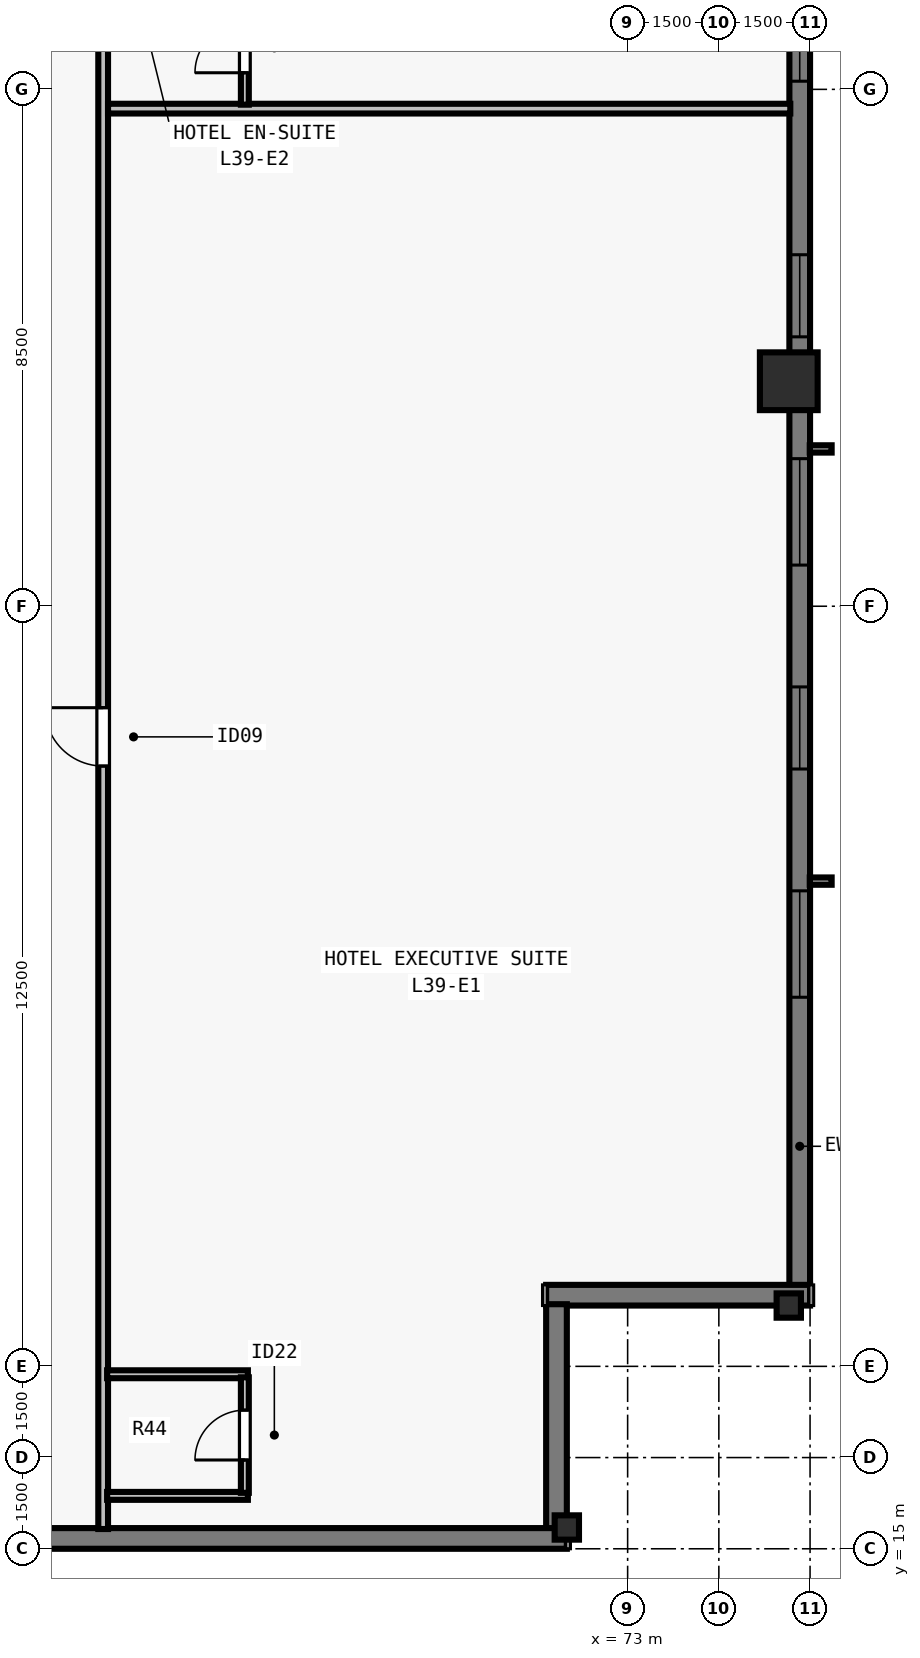
"""IFC4 building model, lengths in metres.
Left out: names, types, materials, properties, quantities, classifications, styles, units other than length and angle.
Written with IfcOpenShell. Run it as: python <this file> out.ifc"""

import sys

from ifc_helpers import new_model, si_unit, direction, frame, frame_2d, origin, origin_2d, place, context, subcontext, project, spatial, rectangle, i_section, extrude, element, fill, save


model = new_model("IFC4")
c1 = context("Model", 3, precision=1e-05, world=origin(), true_north=direction((0.0, 1.0)))
c2 = subcontext(c1, "Body", "Model", "MODEL_VIEW")
j1 = project(units=[si_unit("LENGTHUNIT", "METRE"), si_unit("PLANEANGLEUNIT", "RADIAN")], contexts=[c1])
p1 = place(None, origin())
s1 = spatial("IfcSite", under=j1, at=p1, CompositionType="ELEMENT")
p2 = place(p1, origin())
s2 = spatial("IfcBuilding", under=s1, at=p2, CompositionType="ELEMENT")
p3 = place(p2, frame((0.0, 0.0, 144.5)))
s3 = spatial("IfcBuildingStorey", under=s2, at=p3, CompositionType="ELEMENT", Elevation=144.5)
for number, where, z_axis, x_axis in (
    (1, (72.0, 15.35, 0.0), (0.0, 0.0, 1.0), (1.0, 0.0, 0.0)),
    (2, (75.65, 19.0, 0.0), (0.0, 0.0, 1.0), (0.0, 1.0, 0.0)),
):
    element("IfcColumn", number, at=place(p3, frame(where, z_axis=z_axis, x_axis=x_axis)), inside=s3, PredefinedType="COLUMN", context=c2, shape_type="SweptSolid", body=[
        extrude(i_section(OverallWidth=0.4, OverallDepth=0.4, WebThickness=0.022, FlangeThickness=0.036, at=origin_2d()), origin(), (0.0, 0.0, 1.0), 3.5),
    ])
p4 = place(p3, frame((75.65, 34.2, 0.0), z_axis=(0.0, 0.0, 1.0), x_axis=(0.0, 1.0, 0.0)))
e3 = element("IfcColumn", 3, at=p4, inside=s3, PredefinedType="COLUMN", context=c2, shape_type="SweptSolid", body=[
    extrude(rectangle(XDim=0.95, YDim=0.95, at=origin_2d()), origin(), (0.0, 0.0, 1.0), 3.5),
])
p5 = place(p3, frame((75.83, 59.0, 0.0), z_axis=(0.0, 0.0, 1.0), x_axis=(0.0, -1.0, 0.0)))
e4 = element("IfcWall", 4, at=p5, inside=s3, PredefinedType="SOLIDWALL", context=c2, shape_type="SweptSolid", body=[
    extrude(rectangle(XDim=39.682, YDim=0.34, at=frame_2d((19.841, 0.0))), origin(), (0.0, 0.0, 1.0), 3.28),
])
p6 = place(p5, frame((4.752, 0.0, 0.8)))
e5 = element("IfcOpeningElement", 5, at=p6, cuts=e4, PredefinedType="OPENING", context=c2, shape_type="SweptSolid", body=[
    extrude(rectangle(XDim=1.75, YDim=1.66, at=frame_2d((0.875, 0.83))), frame((0.0, 0.18, 0.0), z_axis=(0.0, -1.0, 0.0), x_axis=(1.0, 0.0, 0.0)), (0.0, 0.0, 1.0), 0.36),
])
p7 = place(p5, frame((8.505, 0.0, 0.8)))
e6 = element("IfcOpeningElement", 6, at=p7, cuts=e4, PredefinedType="OPENING", context=c2, shape_type="SweptSolid", body=[
    extrude(rectangle(XDim=1.35, YDim=1.66, at=frame_2d((0.675, 0.83))), frame((0.0, 0.18, 0.0), z_axis=(0.0, -1.0, 0.0), x_axis=(1.0, 0.0, 0.0)), (0.0, 0.0, 1.0), 0.36),
])
p8 = place(p5, frame((11.859, 0.0, 0.8)))
e7 = element("IfcOpeningElement", 7, at=p8, cuts=e4, PredefinedType="OPENING", context=c2, shape_type="SweptSolid", body=[
    extrude(rectangle(XDim=1.75, YDim=1.66, at=frame_2d((0.875, 0.83))), frame((0.0, 0.18, 0.0), z_axis=(0.0, -1.0, 0.0), x_axis=(1.0, 0.0, 0.0)), (0.0, 0.0, 1.0), 0.36),
])
p9 = place(p5, frame((16.062, 0.0, 0.8)))
e8 = element("IfcOpeningElement", 8, at=p9, cuts=e4, PredefinedType="OPENING", context=c2, shape_type="SweptSolid", body=[
    extrude(rectangle(XDim=1.35, YDim=1.66, at=frame_2d((0.675, 0.83))), frame((0.0, 0.18, 0.0), z_axis=(0.0, -1.0, 0.0), x_axis=(1.0, 0.0, 0.0)), (0.0, 0.0, 1.0), 0.36),
])
p10 = place(p5, frame((18.116, 0.0, 0.8)))
e9 = element("IfcOpeningElement", 9, at=p10, cuts=e4, PredefinedType="OPENING", context=c2, shape_type="SweptSolid", body=[
    extrude(rectangle(XDim=1.75, YDim=1.66, at=frame_2d((0.875, 0.83))), frame((0.0, 0.18, 0.0), z_axis=(0.0, -1.0, 0.0), x_axis=(1.0, 0.0, 0.0)), (0.0, 0.0, 1.0), 0.36),
])
p11 = place(p5, frame((22.719, 0.0, 0.8)))
e10 = element("IfcOpeningElement", 10, at=p11, cuts=e4, PredefinedType="OPENING", context=c2, shape_type="SweptSolid", body=[
    extrude(rectangle(XDim=1.35, YDim=1.66, at=frame_2d((0.675, 0.83))), frame((0.0, 0.18, 0.0), z_axis=(0.0, -1.0, 0.0), x_axis=(1.0, 0.0, 0.0)), (0.0, 0.0, 1.0), 0.36),
])
p12 = place(p5, frame((26.073, 0.0, 0.8)))
e11 = element("IfcOpeningElement", 11, at=p12, cuts=e4, PredefinedType="OPENING", context=c2, shape_type="SweptSolid", body=[
    extrude(rectangle(XDim=1.75, YDim=1.66, at=frame_2d((0.875, 0.83))), frame((0.0, 0.18, 0.0), z_axis=(0.0, -1.0, 0.0), x_axis=(1.0, 0.0, 0.0)), (0.0, 0.0, 1.0), 0.36),
])
p13 = place(p5, frame((29.827, 0.0, 0.8)))
e12 = element("IfcOpeningElement", 12, at=p13, cuts=e4, PredefinedType="OPENING", context=c2, shape_type="SweptSolid", body=[
    extrude(rectangle(XDim=1.35, YDim=1.66, at=frame_2d((0.675, 0.83))), frame((0.0, 0.18, 0.0), z_axis=(0.0, -1.0, 0.0), x_axis=(1.0, 0.0, 0.0)), (0.0, 0.0, 1.0), 0.36),
])
p14 = place(p5, frame((33.18, 0.0, 0.8)))
e13 = element("IfcOpeningElement", 13, at=p14, cuts=e4, PredefinedType="OPENING", context=c2, shape_type="SweptSolid", body=[
    extrude(rectangle(XDim=1.75, YDim=1.66, at=frame_2d((0.875, 0.83))), frame((0.0, 0.18, 0.0), z_axis=(0.0, -1.0, 0.0), x_axis=(1.0, 0.0, 0.0)), (0.0, 0.0, 1.0), 0.36),
])
p15 = place(p3, frame((76.0, 19.17, 0.0), z_axis=(0.0, 0.0, 1.0), x_axis=(-1.0, 0.0, 0.0)))
e14 = element("IfcWall", 14, at=p15, inside=s3, PredefinedType="SOLIDWALL", context=c2, shape_type="SweptSolid", body=[
    extrude(rectangle(XDim=4.34, YDim=0.34, at=frame_2d((2.17, 0.0))), origin(), (0.0, 0.0, 1.0), 3.28),
])
p16 = place(p3, frame((71.83, 19.022, 0.0), z_axis=(0.0, 0.0, 1.0), x_axis=(0.0, -1.0, 0.0)))
e15 = element("IfcWall", 15, at=p16, inside=s3, PredefinedType="SOLIDWALL", context=c2, shape_type="SweptSolid", body=[
    extrude(rectangle(XDim=3.704, YDim=0.34, at=frame_2d((1.852, 0.0))), origin(), (0.0, 0.0, 1.0), 3.28),
])
p17 = place(p3, frame((72.0, 15.17, 0.0), z_axis=(0.0, 0.0, 1.0), x_axis=(-1.0, 0.0, 0.0)))
e16 = element("IfcWall", 16, at=p17, inside=s3, PredefinedType="SOLIDWALL", context=c2, shape_type="SweptSolid", body=[
    extrude(rectangle(XDim=25.882, YDim=0.34, at=frame_2d((12.941, 0.0))), origin(), (0.0, 0.0, 1.0), 3.28),
])
p18 = place(p17, frame((12.066, 0.0, 0.8)))
e17 = element("IfcOpeningElement", 17, at=p18, cuts=e16, PredefinedType="OPENING", context=c2, shape_type="SweptSolid", body=[
    extrude(rectangle(XDim=1.75, YDim=1.66, at=frame_2d((0.875, 0.83))), frame((0.0, 0.18, 0.0), z_axis=(0.0, -1.0, 0.0), x_axis=(1.0, 0.0, 0.0)), (0.0, 0.0, 1.0), 0.36),
])
p19 = place(p17, frame((15.902, 0.0, 0.8)))
e18 = element("IfcOpeningElement", 18, at=p19, cuts=e16, PredefinedType="OPENING", context=c2, shape_type="SweptSolid", body=[
    extrude(rectangle(XDim=1.35, YDim=1.66, at=frame_2d((0.675, 0.83))), frame((0.0, 0.18, 0.0), z_axis=(0.0, -1.0, 0.0), x_axis=(1.0, 0.0, 0.0)), (0.0, 0.0, 1.0), 0.36),
])
p20 = place(p17, frame((18.889, 0.0, 0.8)))
e19 = element("IfcOpeningElement", 19, at=p20, cuts=e16, PredefinedType="OPENING", context=c2, shape_type="SweptSolid", body=[
    extrude(rectangle(XDim=1.75, YDim=1.66, at=frame_2d((0.875, 0.83))), frame((0.0, 0.18, 0.0), z_axis=(0.0, -1.0, 0.0), x_axis=(1.0, 0.0, 0.0)), (0.0, 0.0, 1.0), 0.36),
])
p21 = place(p17, frame((21.59, 0.0, 0.8)))
e20 = element("IfcOpeningElement", 20, at=p21, cuts=e16, PredefinedType="OPENING", context=c2, shape_type="SweptSolid", body=[
    extrude(rectangle(XDim=0.9, YDim=1.66, at=frame_2d((0.45, 0.83))), frame((0.0, 0.18, 0.0), z_axis=(0.0, -1.0, 0.0), x_axis=(1.0, 0.0, 0.0)), (0.0, 0.0, 1.0), 0.36),
])
p22 = place(p3, frame((64.375, 15.325, 0.0), z_axis=(0.0, 0.0, 1.0), x_axis=(0.0, 1.0, 0.0)))
e21 = element("IfcWall", 21, at=p22, inside=s3, PredefinedType="PARTITIONING", context=c2, shape_type="SweptSolid", body=[
    extrude(rectangle(XDim=47.35, YDim=0.16, at=frame_2d((23.675, 0.0))), origin(), (0.0, 0.0, 1.0), 2.555),
])
p23 = place(p22, frame((12.547, 0.0, 0.0)))
e22 = element("IfcOpeningElement", 22, at=p23, cuts=e21, PredefinedType="OPENING", context=c2, shape_type="SweptSolid", body=[
    extrude(rectangle(XDim=0.96, YDim=2.15, at=frame_2d((0.48, 1.075))), frame((0.0, 0.09, 0.0), z_axis=(0.0, -1.0, 0.0), x_axis=(1.0, 0.0, 0.0)), (0.0, 0.0, 1.0), 0.18),
])
p24 = place(p22, frame((35.902, 0.0, 0.0)))
e23 = element("IfcOpeningElement", 23, at=p24, cuts=e21, PredefinedType="OPENING", context=c2, shape_type="SweptSolid", body=[
    extrude(rectangle(XDim=0.96, YDim=2.15, at=frame_2d((0.48, 1.075))), frame((0.0, 0.09, 0.0), z_axis=(0.0, -1.0, 0.0), x_axis=(1.0, 0.0, 0.0)), (0.0, 0.0, 1.0), 0.18),
])
for number, where, z_axis, x_axis in (
    (24, (64.44, 15.87, 0.0), (0.0, 0.0, 1.0), (1.0, 0.0, 0.0)),
    (25, (64.44, 17.87, 0.0), (0.0, 0.0, 1.0), (1.0, 0.0, 0.0)),
):
    element("IfcWall", number, at=place(p3, frame(where, z_axis=z_axis, x_axis=x_axis)), inside=s3, PredefinedType="PLUMBINGWALL", context=c2, shape_type="SweptSolid", body=[
        extrude(rectangle(XDim=2.315, YDim=0.13, at=frame_2d((1.157, 0.0))), origin(), (0.0, 0.0, 1.0), 3.28),
    ])
p25 = place(p3, frame((66.705, 15.92, 0.0), z_axis=(0.0, 0.0, 1.0), x_axis=(0.0, 1.0, 0.0)))
e26 = element("IfcWall", 26, at=p25, inside=s3, PredefinedType="PLUMBINGWALL", context=c2, shape_type="SweptSolid", body=[
    extrude(rectangle(XDim=1.9, YDim=0.13, at=frame_2d((0.95, 0.0))), origin(), (0.0, 0.0, 1.0), 3.28),
])
p26 = place(p25, frame((0.54, 0.0, 0.0)))
e27 = element("IfcOpeningElement", 27, at=p26, cuts=e26, PredefinedType="OPENING", context=c2, shape_type="SweptSolid", body=[
    extrude(rectangle(XDim=0.82, YDim=2.1, at=frame_2d((0.41, 1.05))), frame((0.0, 0.075, 0.0), z_axis=(0.0, -1.0, 0.0), x_axis=(1.0, 0.0, 0.0)), (0.0, 0.0, 1.0), 0.15),
])
p27 = place(p3, frame((64.455, 38.683, 0.0), z_axis=(0.0, 0.0, 1.0), x_axis=(1.0, 0.0, 0.0)))
e28 = element("IfcWall", 28, at=p27, inside=s3, PredefinedType="PARTITIONING", context=c2, shape_type="SweptSolid", body=[
    extrude(rectangle(XDim=11.22, YDim=0.16, at=frame_2d((5.61, 0.0))), origin(), (0.0, 0.0, 1.0), 3.28),
])
p28 = place(p3, frame((66.705, 38.748, 0.0), z_axis=(0.0, 0.0, 1.0), x_axis=(0.0, 1.0, 0.0)))
e29 = element("IfcWall", 29, at=p28, inside=s3, PredefinedType="PLUMBINGWALL", context=c2, shape_type="SweptSolid", body=[
    extrude(rectangle(XDim=1.885, YDim=0.13, at=frame_2d((0.942, 0.0))), origin(), (0.0, 0.0, 1.0), 3.28),
])
p29 = place(p28, frame((0.525, 0.0, 0.0)))
e30 = element("IfcOpeningElement", 30, at=p29, cuts=e29, PredefinedType="OPENING", context=c2, shape_type="SweptSolid", body=[
    extrude(rectangle(XDim=0.82, YDim=2.1, at=frame_2d((0.41, 1.05))), frame((0.0, 0.075, 0.0), z_axis=(0.0, -1.0, 0.0), x_axis=(1.0, 0.0, 0.0)), (0.0, 0.0, 1.0), 0.15),
])
p30 = place(p10, origin())
e31 = element("IfcWindow", 31, at=p30, inside=s3, PartitioningType="SINGLE_PANEL", PredefinedType="WINDOW", context=c2, shape_type="SweptSolid", body=[
    extrude(rectangle(XDim=1.75, YDim=1.66, at=frame_2d((0.875, 0.83))), frame((0.0, -0.05, 0.0), z_axis=(0.0, -1.0, 0.0), x_axis=(1.0, 0.0, 0.0)), (0.0, 0.0, 1.0), 0.06),
])
fill(e9, e31)
p31 = place(p11, origin())
e32 = element("IfcWindow", 32, at=p31, inside=s3, PartitioningType="SINGLE_PANEL", PredefinedType="WINDOW", context=c2, shape_type="SweptSolid", body=[
    extrude(rectangle(XDim=1.35, YDim=1.66, at=frame_2d((0.675, 0.83))), frame((0.0, -0.05, 0.0), z_axis=(0.0, -1.0, 0.0), x_axis=(1.0, 0.0, 0.0)), (0.0, 0.0, 1.0), 0.06),
])
fill(e10, e32)
p32 = place(p12, origin())
e33 = element("IfcWindow", 33, at=p32, inside=s3, PartitioningType="SINGLE_PANEL", PredefinedType="WINDOW", context=c2, shape_type="SweptSolid", body=[
    extrude(rectangle(XDim=1.75, YDim=1.66, at=frame_2d((0.875, 0.83))), frame((0.0, -0.05, 0.0), z_axis=(0.0, -1.0, 0.0), x_axis=(1.0, 0.0, 0.0)), (0.0, 0.0, 1.0), 0.06),
])
fill(e11, e33)
p33 = place(p13, origin())
e34 = element("IfcWindow", 34, at=p33, inside=s3, PartitioningType="SINGLE_PANEL", PredefinedType="WINDOW", context=c2, shape_type="SweptSolid", body=[
    extrude(rectangle(XDim=1.35, YDim=1.66, at=frame_2d((0.675, 0.83))), frame((0.0, -0.05, 0.0), z_axis=(0.0, -1.0, 0.0), x_axis=(1.0, 0.0, 0.0)), (0.0, 0.0, 1.0), 0.06),
])
fill(e12, e34)
p34 = place(p14, origin())
e35 = element("IfcWindow", 35, at=p34, inside=s3, PartitioningType="SINGLE_PANEL", PredefinedType="WINDOW", context=c2, shape_type="SweptSolid", body=[
    extrude(rectangle(XDim=1.75, YDim=1.66, at=frame_2d((0.875, 0.83))), frame((0.0, -0.05, 0.0), z_axis=(0.0, -1.0, 0.0), x_axis=(1.0, 0.0, 0.0)), (0.0, 0.0, 1.0), 0.06),
])
fill(e13, e35)
p35 = place(p26, origin())
e36 = element("IfcDoor", 36, at=p35, inside=s3, OperationType="SINGLE_SWING_LEFT", PredefinedType="DOOR", context=c2, shape_type="SweptSolid", body=[
    extrude(rectangle(XDim=0.82, YDim=2.1, at=frame_2d((0.41, 1.05))), frame((0.0, 0.025, 0.0), z_axis=(0.0, -1.0, 0.0), x_axis=(1.0, 0.0, 0.0)), (0.0, 0.0, 1.0), 0.05),
])
fill(e27, e36)
p36 = place(p23, origin())
e37 = element("IfcDoor", 37, at=p36, inside=s3, OperationType="SINGLE_SWING_RIGHT", PredefinedType="DOOR", context=c2, shape_type="SweptSolid", body=[
    extrude(rectangle(XDim=0.96, YDim=2.15, at=frame_2d((0.48, 1.075))), frame((0.0, 0.025, 0.0), z_axis=(0.0, -1.0, 0.0), x_axis=(1.0, 0.0, 0.0)), (0.0, 0.0, 1.0), 0.05),
])
fill(e22, e37)
p37 = place(p29, origin())
e38 = element("IfcDoor", 38, at=p37, inside=s3, OperationType="SINGLE_SWING_LEFT", PredefinedType="DOOR", context=c2, shape_type="SweptSolid", body=[
    extrude(rectangle(XDim=0.82, YDim=2.1, at=frame_2d((0.41, 1.05))), frame((0.0, 0.025, 0.0), z_axis=(0.0, -1.0, 0.0), x_axis=(1.0, 0.0, 0.0)), (0.0, 0.0, 1.0), 0.05),
])
fill(e30, e38)
save(model, sys.argv[1])
